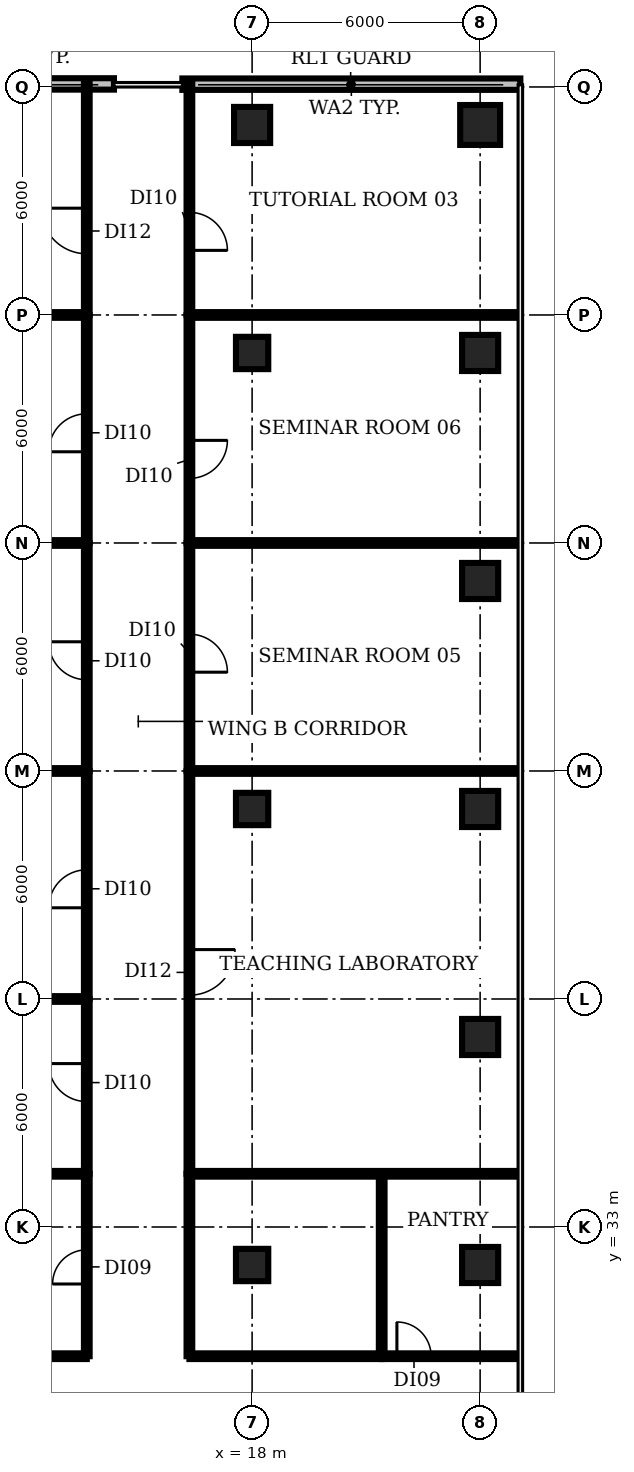
"""IFC4 building model, lengths in metres.
Left out: names, types, materials, properties, quantities, classifications, styles, units other than length and angle.
Written with IfcOpenShell. Run it as: python <this file> out.ifc"""

import sys

from ifc_helpers import new_model, si_unit, direction, frame, frame_2d, origin, origin_2d, place, context, subcontext, project, spatial, rectangle, circle, extrude, element, fill, save


model = new_model("IFC4")
c1 = context("Model", 3, precision=1e-05, world=origin(), true_north=direction((0.0, 1.0)))
c2 = subcontext(c1, "Body", "Model", "MODEL_VIEW")
j1 = project(units=[si_unit("LENGTHUNIT", "METRE"), si_unit("PLANEANGLEUNIT", "RADIAN")], contexts=[c1])
p1 = place(None, origin())
s1 = spatial("IfcSite", under=j1, at=p1, CompositionType="ELEMENT")
p2 = place(p1, origin())
s2 = spatial("IfcBuilding", under=s1, at=p2, CompositionType="ELEMENT")
p3 = place(p2, frame((0.0, 0.0, 71.0)))
s3 = spatial("IfcBuildingStorey", under=s2, at=p3, CompositionType="ELEMENT", Elevation=71.0)
for number, where, z_axis, x_axis in (
    (1, (18.0, 32.0, 0.0), (0.0, 0.0, 1.0), (1.0, 0.0, 0.0)),
    (2, (18.0, 44.0, 0.0), (0.0, 0.0, 1.0), (1.0, 0.0, 0.0)),
    (3, (18.0, 56.0, 0.0), (0.0, 0.0, 1.0), (1.0, 0.0, 0.0)),
):
    element("IfcColumn", number, at=place(p3, frame(where, z_axis=z_axis, x_axis=x_axis)), inside=s3, PredefinedType="COLUMN", context=c2, shape_type="SweptSolid", body=[
        extrude(rectangle(XDim=0.85, YDim=0.85, at=origin_2d()), origin(), (0.0, 0.0, 1.0), 3.85),
    ])
for number, where, z_axis, x_axis in (
    (4, (18.0, 62.0, 0.0), (0.0, 0.0, 1.0), (1.0, 0.0, 0.0)),
    (5, (24.0, 32.0, 0.0), (0.0, 0.0, 1.0), (1.0, 0.0, 0.0)),
    (6, (24.0, 38.0, 0.0), (0.0, 0.0, 1.0), (1.0, 0.0, 0.0)),
    (7, (24.0, 44.0, 0.0), (0.0, 0.0, 1.0), (1.0, 0.0, 0.0)),
    (8, (24.0, 50.0, 0.0), (0.0, 0.0, 1.0), (1.0, 0.0, 0.0)),
    (9, (24.0, 56.0, 0.0), (0.0, 0.0, 1.0), (1.0, 0.0, 0.0)),
):
    element("IfcColumn", number, at=place(p3, frame(where, z_axis=z_axis, x_axis=x_axis)), inside=s3, PredefinedType="COLUMN", context=c2, shape_type="SweptSolid", body=[
        extrude(rectangle(XDim=0.95, YDim=0.95, at=origin_2d()), origin(), (0.0, 0.0, 1.0), 3.85),
    ])
p4 = place(p3, frame((24.0, 62.0, 0.0), z_axis=(0.0, 0.0, 1.0), x_axis=(1.0, 0.0, 0.0)))
e10 = element("IfcColumn", 10, at=p4, inside=s3, PredefinedType="COLUMN", context=c2, shape_type="SweptSolid", body=[
    extrude(circle(Radius=0.525, at=origin_2d()), origin(), (0.0, 0.0, 1.0), 3.85),
])
p5 = place(p3, frame((25.058, 63.074, 0.0), z_axis=(0.0, 0.0, 1.0), x_axis=(-1.0, 0.0, 0.0)))
e11 = element("IfcWall", 11, at=p5, inside=s3, PredefinedType="SOLIDWALL", context=c2, shape_type="SweptSolid", body=[
    extrude(rectangle(XDim=8.894, YDim=0.3, at=frame_2d((4.447, 0.0))), origin(), (0.0, 0.0, 1.0), 3.85),
])
p6 = place(p3, frame((14.365, 63.08, 0.0), z_axis=(0.0, 0.0, 1.0), x_axis=(-1.0, 0.0, 0.0)))
e12 = element("IfcWall", 12, at=p6, inside=s3, PredefinedType="SOLIDWALL", context=c2, shape_type="SweptSolid", body=[
    extrude(rectangle(XDim=4.729, YDim=0.3, at=frame_2d((2.365, 0.0))), origin(), (0.0, 0.0, 1.0), 3.85),
])
p7 = place(p3, frame((-3.67, 57.0, 0.0), z_axis=(0.0, 0.0, 1.0), x_axis=(1.0, 0.0, 0.0)))
e13 = element("IfcWall", 13, at=p7, inside=s3, PredefinedType="PARTITIONING", context=c2, shape_type="SweptSolid", body=[
    extrude(rectangle(XDim=17.32, YDim=0.15, at=frame_2d((8.66, 0.0))), origin(), (0.0, 0.0, 1.0), 2.83),
])
p8 = place(p3, frame((-3.2, 51.0, 0.0), z_axis=(0.0, 0.0, 1.0), x_axis=(1.0, 0.0, 0.0)))
e14 = element("IfcWall", 14, at=p8, inside=s3, PredefinedType="PARTITIONING", context=c2, shape_type="SweptSolid", body=[
    extrude(rectangle(XDim=16.85, YDim=0.15, at=frame_2d((8.425, 0.0))), origin(), (0.0, 0.0, 1.0), 2.83),
])
p9 = place(p3, frame((-2.73, 45.0, 0.0), z_axis=(0.0, 0.0, 1.0), x_axis=(1.0, 0.0, 0.0)))
e15 = element("IfcWall", 15, at=p9, inside=s3, PredefinedType="PARTITIONING", context=c2, shape_type="SweptSolid", body=[
    extrude(rectangle(XDim=16.38, YDim=0.15, at=frame_2d((8.19, 0.0))), origin(), (0.0, 0.0, 1.0), 2.83),
])
p10 = place(p3, frame((-2.25, 39.0, 0.0), z_axis=(0.0, 0.0, 1.0), x_axis=(1.0, 0.0, 0.0)))
e16 = element("IfcWall", 16, at=p10, inside=s3, PredefinedType="PARTITIONING", context=c2, shape_type="SweptSolid", body=[
    extrude(rectangle(XDim=15.9, YDim=0.15, at=frame_2d((7.95, 0.0))), origin(), (0.0, 0.0, 1.0), 2.83),
])
p11 = place(p3, frame((-1.89, 34.4, 0.0), z_axis=(0.0, 0.0, 1.0), x_axis=(1.0, 0.0, 0.0)))
e17 = element("IfcWall", 17, at=p11, inside=s3, PredefinedType="PARTITIONING", context=c2, shape_type="SweptSolid", body=[
    extrude(rectangle(XDim=15.54, YDim=0.15, at=frame_2d((7.77, 0.0))), origin(), (0.0, 0.0, 1.0), 2.83),
])
p12 = place(p3, frame((8.8, 29.6, 0.0), z_axis=(0.0, 0.0, 1.0), x_axis=(1.0, 0.0, 0.0)))
e18 = element("IfcWall", 18, at=p12, inside=s3, PredefinedType="PARTITIONING", context=c2, shape_type="SweptSolid", body=[
    extrude(rectangle(XDim=4.85, YDim=0.15, at=frame_2d((2.425, 0.0))), origin(), (0.0, 0.0, 1.0), 2.83),
])
p13 = place(p3, frame((13.65, 29.6, 0.0), z_axis=(0.0, 0.0, 1.0), x_axis=(0.0, 1.0, 0.0)))
e19 = element("IfcWall", 19, at=p13, inside=s3, PredefinedType="PARTITIONING", context=c2, shape_type="SweptSolid", body=[
    extrude(rectangle(XDim=4.8, YDim=0.15, at=frame_2d((2.4, 0.0))), origin(), (0.0, 0.0, 1.0), 2.83),
])
p14 = place(p13, frame((1.9, 0.0, 0.0)))
e20 = element("IfcOpeningElement", 20, at=p14, cuts=e19, PredefinedType="OPENING", context=c2, shape_type="SweptSolid", body=[
    extrude(rectangle(XDim=0.9, YDim=2.1, at=frame_2d((0.45, 1.05))), frame((0.0, 0.085, 0.0), z_axis=(0.0, -1.0, 0.0), x_axis=(1.0, 0.0, 0.0)), (0.0, 0.0, 1.0), 0.17),
])
p15 = place(p3, frame((13.65, 34.4, 0.0), z_axis=(0.0, 0.0, 1.0), x_axis=(0.0, 1.0, 0.0)))
e21 = element("IfcWall", 21, at=p15, inside=s3, PredefinedType="PARTITIONING", context=c2, shape_type="SweptSolid", body=[
    extrude(rectangle(XDim=4.6, YDim=0.15, at=frame_2d((2.3, 0.0))), origin(), (0.0, 0.0, 1.0), 2.83),
])
p16 = place(p15, frame((1.9, 0.0, 0.0)))
e22 = element("IfcOpeningElement", 22, at=p16, cuts=e21, PredefinedType="OPENING", context=c2, shape_type="SweptSolid", body=[
    extrude(rectangle(XDim=1.0, YDim=2.1, at=frame_2d((0.5, 1.05))), frame((0.0, 0.085, 0.0), z_axis=(0.0, -1.0, 0.0), x_axis=(1.0, 0.0, 0.0)), (0.0, 0.0, 1.0), 0.17),
])
p17 = place(p3, frame((13.65, 39.0, 0.0), z_axis=(0.0, 0.0, 1.0), x_axis=(0.0, 1.0, 0.0)))
e23 = element("IfcWall", 23, at=p17, inside=s3, PredefinedType="PARTITIONING", context=c2, shape_type="SweptSolid", body=[
    extrude(rectangle(XDim=6.0, YDim=0.15, at=frame_2d((3.0, 0.0))), origin(), (0.0, 0.0, 1.0), 2.83),
])
p18 = place(p17, frame((2.4, 0.0, 0.0)))
e24 = element("IfcOpeningElement", 24, at=p18, cuts=e23, PredefinedType="OPENING", context=c2, shape_type="SweptSolid", body=[
    extrude(rectangle(XDim=1.0, YDim=2.1, at=frame_2d((0.5, 1.05))), frame((0.0, 0.085, 0.0), z_axis=(0.0, -1.0, 0.0), x_axis=(1.0, 0.0, 0.0)), (0.0, 0.0, 1.0), 0.17),
])
p19 = place(p3, frame((13.65, 45.0, 0.0), z_axis=(0.0, 0.0, 1.0), x_axis=(0.0, 1.0, 0.0)))
e25 = element("IfcWall", 25, at=p19, inside=s3, PredefinedType="PARTITIONING", context=c2, shape_type="SweptSolid", body=[
    extrude(rectangle(XDim=6.0, YDim=0.15, at=frame_2d((3.0, 0.0))), origin(), (0.0, 0.0, 1.0), 2.83),
])
p20 = place(p19, frame((2.4, 0.0, 0.0)))
e26 = element("IfcOpeningElement", 26, at=p20, cuts=e25, PredefinedType="OPENING", context=c2, shape_type="SweptSolid", body=[
    extrude(rectangle(XDim=1.0, YDim=2.1, at=frame_2d((0.5, 1.05))), frame((0.0, 0.085, 0.0), z_axis=(0.0, -1.0, 0.0), x_axis=(1.0, 0.0, 0.0)), (0.0, 0.0, 1.0), 0.17),
])
p21 = place(p3, frame((13.65, 51.0, 0.0), z_axis=(0.0, 0.0, 1.0), x_axis=(0.0, 1.0, 0.0)))
e27 = element("IfcWall", 27, at=p21, inside=s3, PredefinedType="PARTITIONING", context=c2, shape_type="SweptSolid", body=[
    extrude(rectangle(XDim=6.0, YDim=0.15, at=frame_2d((3.0, 0.0))), origin(), (0.0, 0.0, 1.0), 2.83),
])
p22 = place(p21, frame((2.4, 0.0, 0.0)))
e28 = element("IfcOpeningElement", 28, at=p22, cuts=e27, PredefinedType="OPENING", context=c2, shape_type="SweptSolid", body=[
    extrude(rectangle(XDim=1.0, YDim=2.1, at=frame_2d((0.5, 1.05))), frame((0.0, 0.085, 0.0), z_axis=(0.0, -1.0, 0.0), x_axis=(1.0, 0.0, 0.0)), (0.0, 0.0, 1.0), 0.17),
])
p23 = place(p3, frame((13.65, 57.0, 0.0), z_axis=(0.0, 0.0, 1.0), x_axis=(0.0, 1.0, 0.0)))
e29 = element("IfcWall", 29, at=p23, inside=s3, PredefinedType="PARTITIONING", context=c2, shape_type="SweptSolid", body=[
    extrude(rectangle(XDim=6.118, YDim=0.15, at=frame_2d((3.059, 0.0))), origin(), (0.0, 0.0, 1.0), 2.83),
])
p24 = place(p23, frame((1.61, 0.0, 0.0)))
e30 = element("IfcOpeningElement", 30, at=p24, cuts=e29, PredefinedType="OPENING", context=c2, shape_type="SweptSolid", body=[
    extrude(rectangle(XDim=1.2, YDim=2.1, at=frame_2d((0.6, 1.05))), frame((0.0, 0.085, 0.0), z_axis=(0.0, -1.0, 0.0), x_axis=(1.0, 0.0, 0.0)), (0.0, 0.0, 1.0), 0.17),
])
p25 = place(p3, frame((16.35, 29.6, 0.0), z_axis=(0.0, 0.0, 1.0), x_axis=(0.0, 1.0, 0.0)))
e31 = element("IfcWall", 31, at=p25, inside=s3, PredefinedType="PARTITIONING", context=c2, shape_type="SweptSolid", body=[
    extrude(rectangle(XDim=4.8, YDim=0.15, at=frame_2d((2.4, 0.0))), origin(), (0.0, 0.0, 1.0), 2.83),
])
p26 = place(p3, frame((16.35, 29.6, 0.0), z_axis=(0.0, 0.0, 1.0), x_axis=(1.0, 0.0, 0.0)))
e32 = element("IfcWall", 32, at=p26, inside=s3, PredefinedType="PARTITIONING", context=c2, shape_type="SweptSolid", body=[
    extrude(rectangle(XDim=5.06, YDim=0.15, at=frame_2d((2.53, 0.0))), origin(), (0.0, 0.0, 1.0), 2.83),
])
p27 = place(p3, frame((16.35, 34.4, 0.0), z_axis=(0.0, 0.0, 1.0), x_axis=(1.0, 0.0, 0.0)))
e33 = element("IfcWall", 33, at=p27, inside=s3, PredefinedType="PARTITIONING", context=c2, shape_type="SweptSolid", body=[
    extrude(rectangle(XDim=8.66, YDim=0.15, at=frame_2d((4.33, 0.0))), origin(), (0.0, 0.0, 1.0), 2.83),
])
p28 = place(p3, frame((16.35, 45.0, 0.0), z_axis=(0.0, 0.0, 1.0), x_axis=(0.0, -1.0, 0.0)))
e34 = element("IfcWall", 34, at=p28, inside=s3, PredefinedType="PARTITIONING", context=c2, shape_type="SweptSolid", body=[
    extrude(rectangle(XDim=10.6, YDim=0.15, at=frame_2d((5.3, 0.0))), origin(), (0.0, 0.0, 1.0), 2.83),
])
p29 = place(p28, frame((4.7, 0.0, 0.0)))
e35 = element("IfcOpeningElement", 35, at=p29, cuts=e34, PredefinedType="OPENING", context=c2, shape_type="SweptSolid", body=[
    extrude(rectangle(XDim=1.2, YDim=2.1, at=frame_2d((0.6, 1.05))), frame((0.0, 0.085, 0.0), z_axis=(0.0, -1.0, 0.0), x_axis=(1.0, 0.0, 0.0)), (0.0, 0.0, 1.0), 0.17),
])
p30 = place(p3, frame((16.35, 45.0, 0.0), z_axis=(0.0, 0.0, 1.0), x_axis=(1.0, 0.0, 0.0)))
e36 = element("IfcWall", 36, at=p30, inside=s3, PredefinedType="PARTITIONING", context=c2, shape_type="SweptSolid", body=[
    extrude(rectangle(XDim=8.66, YDim=0.15, at=frame_2d((4.33, 0.0))), origin(), (0.0, 0.0, 1.0), 2.83),
])
p31 = place(p3, frame((16.35, 51.0, 0.0), z_axis=(0.0, 0.0, 1.0), x_axis=(0.0, -1.0, 0.0)))
e37 = element("IfcWall", 37, at=p31, inside=s3, PredefinedType="PARTITIONING", context=c2, shape_type="SweptSolid", body=[
    extrude(rectangle(XDim=6.0, YDim=0.15, at=frame_2d((3.0, 0.0))), origin(), (0.0, 0.0, 1.0), 2.83),
])
p32 = place(p31, frame((2.4, 0.0, 0.0)))
e38 = element("IfcOpeningElement", 38, at=p32, cuts=e37, PredefinedType="OPENING", context=c2, shape_type="SweptSolid", body=[
    extrude(rectangle(XDim=1.0, YDim=2.1, at=frame_2d((0.5, 1.05))), frame((0.0, 0.085, 0.0), z_axis=(0.0, -1.0, 0.0), x_axis=(1.0, 0.0, 0.0)), (0.0, 0.0, 1.0), 0.17),
])
p33 = place(p3, frame((16.35, 51.0, 0.0), z_axis=(0.0, 0.0, 1.0), x_axis=(1.0, 0.0, 0.0)))
e39 = element("IfcWall", 39, at=p33, inside=s3, PredefinedType="PARTITIONING", context=c2, shape_type="SweptSolid", body=[
    extrude(rectangle(XDim=8.66, YDim=0.15, at=frame_2d((4.33, 0.0))), origin(), (0.0, 0.0, 1.0), 2.83),
])
p34 = place(p3, frame((16.35, 57.0, 0.0), z_axis=(0.0, 0.0, 1.0), x_axis=(0.0, -1.0, 0.0)))
e40 = element("IfcWall", 40, at=p34, inside=s3, PredefinedType="PARTITIONING", context=c2, shape_type="SweptSolid", body=[
    extrude(rectangle(XDim=6.0, YDim=0.15, at=frame_2d((3.0, 0.0))), origin(), (0.0, 0.0, 1.0), 2.83),
])
p35 = place(p34, frame((3.3, 0.0, 0.0)))
e41 = element("IfcOpeningElement", 41, at=p35, cuts=e40, PredefinedType="OPENING", context=c2, shape_type="SweptSolid", body=[
    extrude(rectangle(XDim=1.0, YDim=2.1, at=frame_2d((0.5, 1.05))), frame((0.0, 0.085, 0.0), z_axis=(0.0, -1.0, 0.0), x_axis=(1.0, 0.0, 0.0)), (0.0, 0.0, 1.0), 0.17),
])
p36 = place(p3, frame((16.35, 57.0, 0.0), z_axis=(0.0, 0.0, 1.0), x_axis=(1.0, 0.0, 0.0)))
e42 = element("IfcWall", 42, at=p36, inside=s3, PredefinedType="PARTITIONING", context=c2, shape_type="SweptSolid", body=[
    extrude(rectangle(XDim=8.643, YDim=0.15, at=frame_2d((4.321, 0.0))), origin(), (0.0, 0.0, 1.0), 2.83),
])
p37 = place(p3, frame((16.35, 63.118, 0.0), z_axis=(0.0, 0.0, 1.0), x_axis=(0.0, -1.0, 0.0)))
e43 = element("IfcWall", 43, at=p37, inside=s3, PredefinedType="PARTITIONING", context=c2, shape_type="SweptSolid", body=[
    extrude(rectangle(XDim=6.118, YDim=0.15, at=frame_2d((3.059, 0.0))), origin(), (0.0, 0.0, 1.0), 2.83),
])
p38 = place(p37, frame((3.418, 0.0, 0.0)))
e44 = element("IfcOpeningElement", 44, at=p38, cuts=e43, PredefinedType="OPENING", context=c2, shape_type="SweptSolid", body=[
    extrude(rectangle(XDim=1.0, YDim=2.1, at=frame_2d((0.5, 1.05))), frame((0.0, 0.085, 0.0), z_axis=(0.0, -1.0, 0.0), x_axis=(1.0, 0.0, 0.0)), (0.0, 0.0, 1.0), 0.17),
])
p39 = place(p3, frame((21.41, 29.6, 0.0), z_axis=(0.0, 0.0, 1.0), x_axis=(0.0, 1.0, 0.0)))
e45 = element("IfcWall", 45, at=p39, inside=s3, PredefinedType="PARTITIONING", context=c2, shape_type="SweptSolid", body=[
    extrude(rectangle(XDim=4.8, YDim=0.15, at=frame_2d((2.4, 0.0))), origin(), (0.0, 0.0, 1.0), 2.83),
])
p40 = place(p3, frame((21.41, 29.6, 0.0), z_axis=(0.0, 0.0, 1.0), x_axis=(1.0, 0.0, 0.0)))
e46 = element("IfcWall", 46, at=p40, inside=s3, PredefinedType="PARTITIONING", context=c2, shape_type="SweptSolid", body=[
    extrude(rectangle(XDim=3.6, YDim=0.15, at=frame_2d((1.8, 0.0))), origin(), (0.0, 0.0, 1.0), 2.83),
])
p41 = place(p40, frame((0.4, 0.0, 0.0)))
e47 = element("IfcOpeningElement", 47, at=p41, cuts=e46, PredefinedType="OPENING", context=c2, shape_type="SweptSolid", body=[
    extrude(rectangle(XDim=0.9, YDim=2.1, at=frame_2d((0.45, 1.05))), frame((0.0, 0.085, 0.0), z_axis=(0.0, -1.0, 0.0), x_axis=(1.0, 0.0, 0.0)), (0.0, 0.0, 1.0), 0.17),
])
p42 = place(p14, origin())
e48 = element("IfcDoor", 48, at=p42, inside=s3, OperationType="SINGLE_SWING_LEFT", PredefinedType="DOOR", context=c2, shape_type="SweptSolid", body=[
    extrude(rectangle(XDim=0.9, YDim=2.1, at=frame_2d((0.45, 1.05))), frame((0.0, 0.025, 0.0), z_axis=(0.0, -1.0, 0.0), x_axis=(1.0, 0.0, 0.0)), (0.0, 0.0, 1.0), 0.05),
])
fill(e20, e48)
p43 = place(p16, origin())
e49 = element("IfcDoor", 49, at=p43, inside=s3, OperationType="SINGLE_SWING_RIGHT", PredefinedType="DOOR", context=c2, shape_type="SweptSolid", body=[
    extrude(rectangle(XDim=1.0, YDim=2.1, at=frame_2d((0.5, 1.05))), frame((0.0, 0.025, 0.0), z_axis=(0.0, -1.0, 0.0), x_axis=(1.0, 0.0, 0.0)), (0.0, 0.0, 1.0), 0.05),
])
fill(e22, e49)
p44 = place(p18, origin())
e50 = element("IfcDoor", 50, at=p44, inside=s3, OperationType="SINGLE_SWING_LEFT", PredefinedType="DOOR", context=c2, shape_type="SweptSolid", body=[
    extrude(rectangle(XDim=1.0, YDim=2.1, at=frame_2d((0.5, 1.05))), frame((0.0, 0.025, 0.0), z_axis=(0.0, -1.0, 0.0), x_axis=(1.0, 0.0, 0.0)), (0.0, 0.0, 1.0), 0.05),
])
fill(e24, e50)
p45 = place(p20, origin())
e51 = element("IfcDoor", 51, at=p45, inside=s3, OperationType="SINGLE_SWING_RIGHT", PredefinedType="DOOR", context=c2, shape_type="SweptSolid", body=[
    extrude(rectangle(XDim=1.0, YDim=2.1, at=frame_2d((0.5, 1.05))), frame((0.0, 0.025, 0.0), z_axis=(0.0, -1.0, 0.0), x_axis=(1.0, 0.0, 0.0)), (0.0, 0.0, 1.0), 0.05),
])
fill(e26, e51)
p46 = place(p22, origin())
e52 = element("IfcDoor", 52, at=p46, inside=s3, OperationType="SINGLE_SWING_LEFT", PredefinedType="DOOR", context=c2, shape_type="SweptSolid", body=[
    extrude(rectangle(XDim=1.0, YDim=2.1, at=frame_2d((0.5, 1.05))), frame((0.0, 0.025, 0.0), z_axis=(0.0, -1.0, 0.0), x_axis=(1.0, 0.0, 0.0)), (0.0, 0.0, 1.0), 0.05),
])
fill(e28, e52)
p47 = place(p24, origin())
e53 = element("IfcDoor", 53, at=p47, inside=s3, OperationType="SINGLE_SWING_RIGHT", PredefinedType="DOOR", context=c2, shape_type="SweptSolid", body=[
    extrude(rectangle(XDim=1.2, YDim=2.1, at=frame_2d((0.6, 1.05))), frame((0.0, 0.025, 0.0), z_axis=(0.0, -1.0, 0.0), x_axis=(1.0, 0.0, 0.0)), (0.0, 0.0, 1.0), 0.05),
])
fill(e30, e53)
p48 = place(p29, origin())
e54 = element("IfcDoor", 54, at=p48, inside=s3, OperationType="SINGLE_SWING_LEFT", PredefinedType="DOOR", context=c2, shape_type="SweptSolid", body=[
    extrude(rectangle(XDim=1.2, YDim=2.1, at=frame_2d((0.6, 1.05))), frame((0.0, 0.025, 0.0), z_axis=(0.0, -1.0, 0.0), x_axis=(1.0, 0.0, 0.0)), (0.0, 0.0, 1.0), 0.05),
])
fill(e35, e54)
p49 = place(p32, origin())
e55 = element("IfcDoor", 55, at=p49, inside=s3, OperationType="SINGLE_SWING_RIGHT", PredefinedType="DOOR", context=c2, shape_type="SweptSolid", body=[
    extrude(rectangle(XDim=1.0, YDim=2.1, at=frame_2d((0.5, 1.05))), frame((0.0, 0.025, 0.0), z_axis=(0.0, -1.0, 0.0), x_axis=(1.0, 0.0, 0.0)), (0.0, 0.0, 1.0), 0.05),
])
fill(e38, e55)
p50 = place(p35, origin())
e56 = element("IfcDoor", 56, at=p50, inside=s3, OperationType="SINGLE_SWING_LEFT", PredefinedType="DOOR", context=c2, shape_type="SweptSolid", body=[
    extrude(rectangle(XDim=1.0, YDim=2.1, at=frame_2d((0.5, 1.05))), frame((0.0, 0.025, 0.0), z_axis=(0.0, -1.0, 0.0), x_axis=(1.0, 0.0, 0.0)), (0.0, 0.0, 1.0), 0.05),
])
fill(e41, e56)
p51 = place(p38, origin())
e57 = element("IfcDoor", 57, at=p51, inside=s3, OperationType="SINGLE_SWING_RIGHT", PredefinedType="DOOR", context=c2, shape_type="SweptSolid", body=[
    extrude(rectangle(XDim=1.0, YDim=2.1, at=frame_2d((0.5, 1.05))), frame((0.0, 0.025, 0.0), z_axis=(0.0, -1.0, 0.0), x_axis=(1.0, 0.0, 0.0)), (0.0, 0.0, 1.0), 0.05),
])
fill(e44, e57)
p52 = place(p41, origin())
e58 = element("IfcDoor", 58, at=p52, inside=s3, OperationType="SINGLE_SWING_LEFT", PredefinedType="DOOR", context=c2, shape_type="SweptSolid", body=[
    extrude(rectangle(XDim=0.9, YDim=2.1, at=frame_2d((0.45, 1.05))), frame((0.0, 0.025, 0.0), z_axis=(0.0, -1.0, 0.0), x_axis=(1.0, 0.0, 0.0)), (0.0, 0.0, 1.0), 0.05),
])
fill(e47, e58)
save(model, sys.argv[1])
